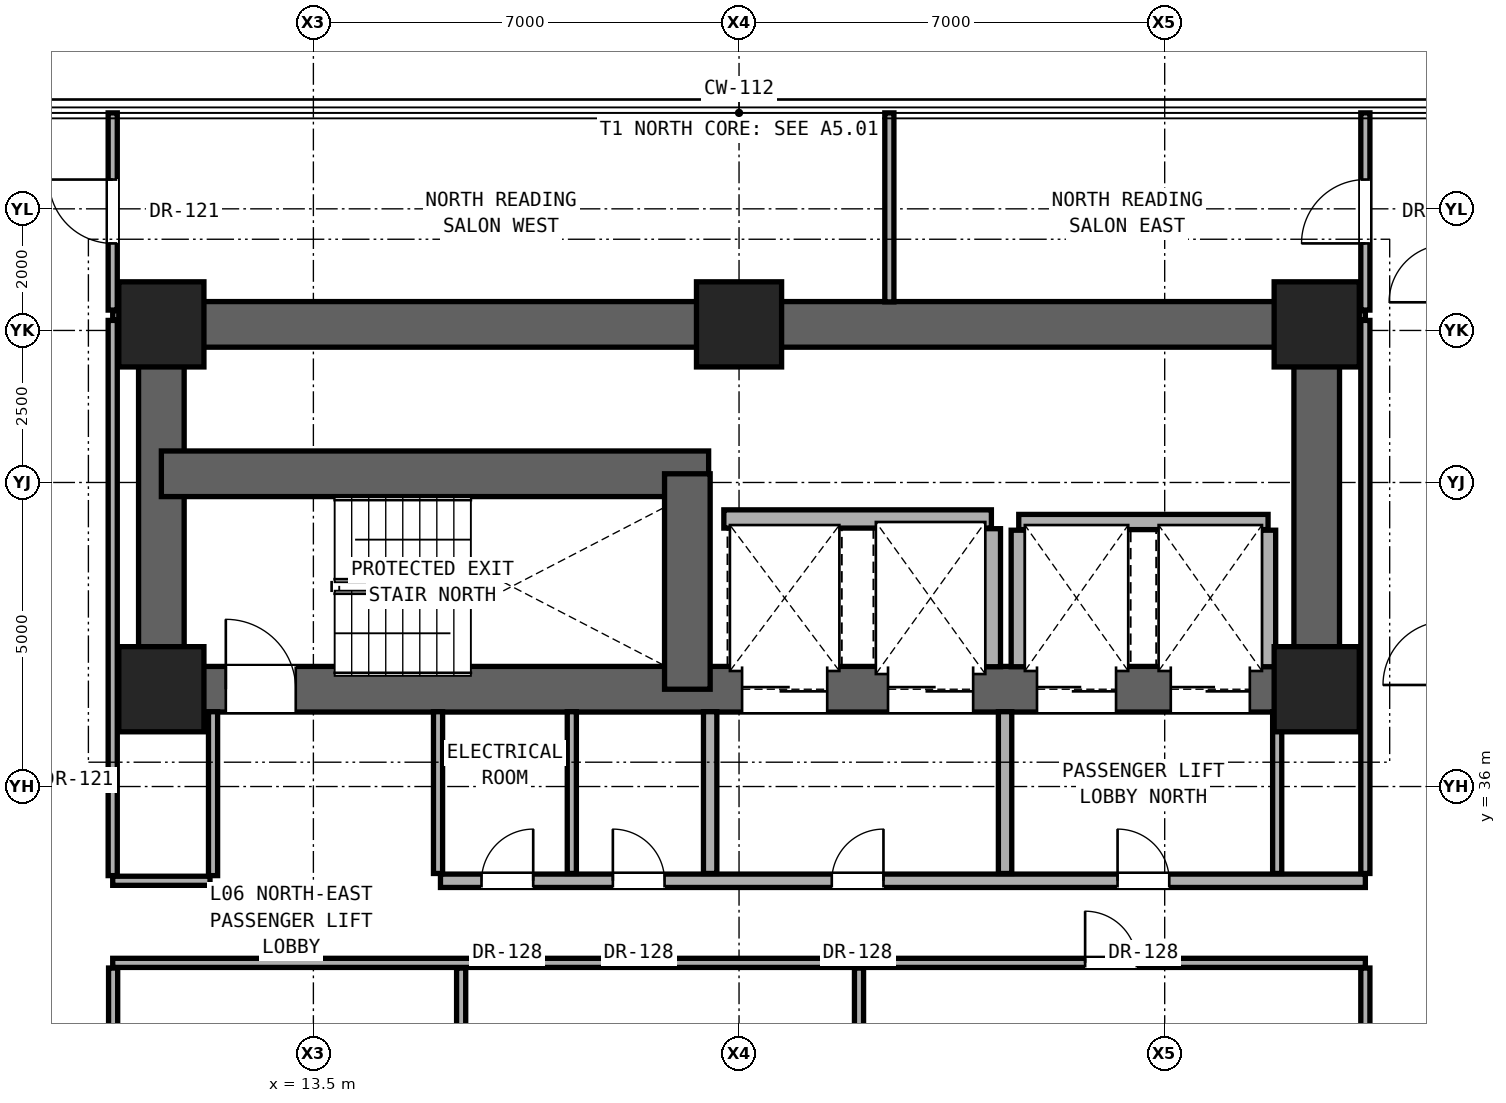
"""IFC4 building model, lengths in metres.
Left out: names, types, materials, properties, quantities, classifications, styles, units other than length and angle.
Written with IfcOpenShell. Run it as: python <this file> out.ifc"""

import sys

from ifc_helpers import new_model, si_unit, direction, frame, frame_2d, origin, origin_2d, place, context, subcontext, project, spatial, rectangle, extrude, element, fill, save


model = new_model("IFC4")
c1 = context("Model", 3, precision=1e-05, world=origin(), true_north=direction((0.0, 1.0)))
c2 = subcontext(c1, "Body", "Model", "MODEL_VIEW")
j1 = project(units=[si_unit("LENGTHUNIT", "METRE"), si_unit("PLANEANGLEUNIT", "RADIAN")], contexts=[c1])
p1 = place(None, origin())
s1 = spatial("IfcSite", under=j1, at=p1, CompositionType="ELEMENT")
p2 = place(p1, origin())
s2 = spatial("IfcBuilding", under=s1, at=p2, CompositionType="ELEMENT")
p3 = place(p2, frame((0.0, 0.0, 25.7)))
s3 = spatial("IfcBuildingStorey", under=s2, at=p3, CompositionType="ELEMENT", Elevation=25.7)
for number, where, z_axis, x_axis in (
    (1, (11.0, 37.6, 0.0), (0.0, 0.0, 1.0), (1.0, 0.0, 0.0)),
    (2, (30.0, 37.6, 0.0), (0.0, 0.0, 1.0), (1.0, 0.0, 0.0)),
    (3, (11.0, 43.6, 0.0), (0.0, 0.0, 1.0), (1.0, 0.0, 0.0)),
    (4, (20.5, 43.6, 0.0), (0.0, 0.0, 1.0), (1.0, 0.0, 0.0)),
    (5, (30.0, 43.6, 0.0), (0.0, 0.0, 1.0), (1.0, 0.0, 0.0)),
):
    element("IfcColumn", number, at=place(p3, frame(where, z_axis=z_axis, x_axis=x_axis)), inside=s3, PredefinedType="COLUMN", context=c2, shape_type="SweptSolid", body=[
        extrude(rectangle(XDim=1.4, YDim=1.4, at=origin_2d()), origin(), (0.0, 0.0, 1.0), 3.3),
    ])
p4 = place(p3, frame((11.0, 43.6, 0.0), z_axis=(0.0, 0.0, 1.0), x_axis=(1.0, 0.0, 0.0)))
e6 = element("IfcWall", 6, at=p4, inside=s3, PredefinedType="SHEAR", context=c2, shape_type="SweptSolid", body=[
    extrude(rectangle(XDim=19.0, YDim=0.75, at=frame_2d((9.5, 0.0))), origin(), (0.0, 0.0, 1.0), 3.06),
])
for number, where, z_axis, x_axis in (
    (7, (11.0, 37.6, 0.0), (0.0, 0.0, 1.0), (0.0, 1.0, 0.0)),
    (8, (30.0, 37.6, 0.0), (0.0, 0.0, 1.0), (0.0, 1.0, 0.0)),
):
    element("IfcWall", number, at=place(p3, frame(where, z_axis=z_axis, x_axis=x_axis)), inside=s3, PredefinedType="SHEAR", context=c2, shape_type="SweptSolid", body=[
        extrude(rectangle(XDim=6.0, YDim=0.75, at=frame_2d((3.0, 0.0))), origin(), (0.0, 0.0, 1.0), 3.06),
    ])
p5 = place(p3, frame((11.0, 37.6, 0.0), z_axis=(0.0, 0.0, 1.0), x_axis=(1.0, 0.0, 0.0)))
e9 = element("IfcWall", 9, at=p5, inside=s3, PredefinedType="SHEAR", context=c2, shape_type="SweptSolid", body=[
    extrude(rectangle(XDim=19.0, YDim=0.75, at=frame_2d((9.5, 0.0))), origin(), (0.0, 0.0, 1.0), 3.06),
])
p6 = place(p5, frame((1.06, 0.0, 0.0)))
e10 = element("IfcOpeningElement", 10, at=p6, cuts=e9, PredefinedType="OPENING", context=c2, shape_type="SweptSolid", body=[
    extrude(rectangle(XDim=1.15, YDim=2.2, at=frame_2d((0.575, 1.1))), frame((0.0, 0.385, 0.0), z_axis=(0.0, -1.0, 0.0), x_axis=(1.0, 0.0, 0.0)), (0.0, 0.0, 1.0), 0.77),
])
p7 = place(p5, frame((9.55, 0.0, 0.0)))
e11 = element("IfcOpeningElement", 11, at=p7, cuts=e9, PredefinedType="OPENING", context=c2, shape_type="SweptSolid", body=[
    extrude(rectangle(XDim=1.4, YDim=2.35, at=frame_2d((0.7, 1.175))), frame((0.0, 0.385, 0.0), z_axis=(0.0, -1.0, 0.0), x_axis=(1.0, 0.0, 0.0)), (0.0, 0.0, 1.0), 0.77),
])
p8 = place(p5, frame((11.95, 0.0, 0.0)))
e12 = element("IfcOpeningElement", 12, at=p8, cuts=e9, PredefinedType="OPENING", context=c2, shape_type="SweptSolid", body=[
    extrude(rectangle(XDim=1.4, YDim=2.35, at=frame_2d((0.7, 1.175))), frame((0.0, 0.385, 0.0), z_axis=(0.0, -1.0, 0.0), x_axis=(1.0, 0.0, 0.0)), (0.0, 0.0, 1.0), 0.77),
])
p9 = place(p5, frame((14.4, 0.0, 0.0)))
e13 = element("IfcOpeningElement", 13, at=p9, cuts=e9, PredefinedType="OPENING", context=c2, shape_type="SweptSolid", body=[
    extrude(rectangle(XDim=1.3, YDim=2.3, at=frame_2d((0.65, 1.15))), frame((0.0, 0.385, 0.0), z_axis=(0.0, -1.0, 0.0), x_axis=(1.0, 0.0, 0.0)), (0.0, 0.0, 1.0), 0.77),
])
p10 = place(p5, frame((16.6, 0.0, 0.0)))
e14 = element("IfcOpeningElement", 14, at=p10, cuts=e9, PredefinedType="OPENING", context=c2, shape_type="SweptSolid", body=[
    extrude(rectangle(XDim=1.3, YDim=2.3, at=frame_2d((0.65, 1.15))), frame((0.0, 0.385, 0.0), z_axis=(0.0, -1.0, 0.0), x_axis=(1.0, 0.0, 0.0)), (0.0, 0.0, 1.0), 0.77),
])
p11 = place(p3, frame((11.0, 41.143, 0.0), z_axis=(0.0, 0.0, 1.0), x_axis=(1.0, 0.0, 0.0)))
e15 = element("IfcWall", 15, at=p11, inside=s3, PredefinedType="SHEAR", context=c2, shape_type="SweptSolid", body=[
    extrude(rectangle(XDim=9.0, YDim=0.75, at=frame_2d((4.5, 0.0))), origin(), (0.0, 0.0, 1.0), 3.06),
])
p12 = place(p3, frame((19.65, 37.6, 0.0), z_axis=(0.0, 0.0, 1.0), x_axis=(0.0, 1.0, 0.0)))
e16 = element("IfcWall", 16, at=p12, inside=s3, PredefinedType="SHEAR", context=c2, shape_type="SweptSolid", body=[
    extrude(rectangle(XDim=3.543, YDim=0.75, at=frame_2d((1.771, 0.0))), origin(), (0.0, 0.0, 1.0), 3.06),
])
p13 = place(p3, frame((10.2, 33.1, 0.0), z_axis=(0.0, 0.0, 1.0), x_axis=(1.0, 0.0, 0.0)))
e17 = element("IfcWall", 17, at=p13, inside=s3, PredefinedType="PARTITIONING", context=c2, shape_type="SweptSolid", body=[
    extrude(rectangle(XDim=20.6, YDim=0.15, at=frame_2d((10.3, 0.0))), origin(), (0.0, 0.0, 1.0), 2.104),
])
p14 = place(p13, frame((15.991, 0.0, 0.0)))
e18 = element("IfcOpeningElement", 18, at=p14, cuts=e17, PredefinedType="OPENING", context=c2, shape_type="SweptSolid", body=[
    extrude(rectangle(XDim=0.85, YDim=2.01, at=frame_2d((0.425, 1.005))), frame((0.0, 0.085, 0.0), z_axis=(0.0, -1.0, 0.0), x_axis=(1.0, 0.0, 0.0)), (0.0, 0.0, 1.0), 0.17),
])
p15 = place(p3, frame((10.2, 34.45, 0.0), z_axis=(0.0, 0.0, 1.0), x_axis=(1.0, 0.0, 0.0)))
e19 = element("IfcWall", 19, at=p15, inside=s3, PredefinedType="PARTITIONING", context=c2, shape_type="SweptSolid", body=[
    extrude(rectangle(XDim=1.6, YDim=0.15, at=frame_2d((0.8, 0.0))), origin(), (0.0, 0.0, 1.0), 2.104),
])
p16 = place(p3, frame((15.59, 34.45, 0.0), z_axis=(0.0, 0.0, 1.0), x_axis=(1.0, 0.0, 0.0)))
e20 = element("IfcWall", 20, at=p16, inside=s3, PredefinedType="SOLIDWALL", context=c2, shape_type="SweptSolid", body=[
    extrude(rectangle(XDim=15.21, YDim=0.22, at=frame_2d((7.605, 0.0))), origin(), (0.0, 0.0, 1.0), 2.104),
])
p17 = place(p16, frame((6.435, 0.0, 0.0)))
e21 = element("IfcOpeningElement", 21, at=p17, cuts=e20, PredefinedType="OPENING", context=c2, shape_type="SweptSolid", body=[
    extrude(rectangle(XDim=0.85, YDim=2.01, at=frame_2d((0.425, 1.005))), frame((0.0, 0.12, 0.0), z_axis=(0.0, -1.0, 0.0), x_axis=(1.0, 0.0, 0.0)), (0.0, 0.0, 1.0), 0.24),
])
p18 = place(p16, frame((11.135, 0.0, 0.0)))
e22 = element("IfcOpeningElement", 22, at=p18, cuts=e20, PredefinedType="OPENING", context=c2, shape_type="SweptSolid", body=[
    extrude(rectangle(XDim=0.85, YDim=2.01, at=frame_2d((0.425, 1.005))), frame((0.0, 0.12, 0.0), z_axis=(0.0, -1.0, 0.0), x_axis=(1.0, 0.0, 0.0)), (0.0, 0.0, 1.0), 0.24),
])
p19 = place(p16, frame((0.675, 0.0, 0.0)))
e23 = element("IfcOpeningElement", 23, at=p19, cuts=e20, PredefinedType="OPENING", context=c2, shape_type="SweptSolid", body=[
    extrude(rectangle(XDim=0.85, YDim=2.01, at=frame_2d((0.425, 1.005))), frame((0.0, 0.12, 0.0), z_axis=(0.0, -1.0, 0.0), x_axis=(1.0, 0.0, 0.0)), (0.0, 0.0, 1.0), 0.24),
])
p20 = place(p16, frame((2.835, 0.0, 0.0)))
e24 = element("IfcOpeningElement", 24, at=p20, cuts=e20, PredefinedType="OPENING", context=c2, shape_type="SweptSolid", body=[
    extrude(rectangle(XDim=0.85, YDim=2.01, at=frame_2d((0.425, 1.005))), frame((0.0, 0.12, 0.0), z_axis=(0.0, -1.0, 0.0), x_axis=(1.0, 0.0, 0.0)), (0.0, 0.0, 1.0), 0.24),
])
p21 = place(p3, frame((25.1, 40.35, 0.0), z_axis=(0.0, 0.0, 1.0), x_axis=(1.0, 0.0, 0.0)))
e25 = element("IfcWall", 25, at=p21, inside=s3, PredefinedType="SOLIDWALL", context=c2, shape_type="SweptSolid", body=[
    extrude(rectangle(XDim=4.1, YDim=0.25, at=frame_2d((2.05, 0.0))), origin(), (0.0, 0.0, 1.0), 3.06),
])
p22 = place(p3, frame((20.25, 40.4, 0.0), z_axis=(0.0, 0.0, 1.0), x_axis=(1.0, 0.0, 0.0)))
e26 = element("IfcWall", 26, at=p22, inside=s3, PredefinedType="SOLIDWALL", context=c2, shape_type="SweptSolid", body=[
    extrude(rectangle(XDim=4.4, YDim=0.3, at=frame_2d((2.2, 0.0))), origin(), (0.0, 0.0, 1.0), 3.06),
])
for number, where, z_axis, x_axis in (
    (27, (10.2, 43.75, 0.0), (0.0, 0.0, 1.0), (1.0, 0.0, 0.0)),
    (28, (30.37, 43.75, 0.0), (0.0, 0.0, 1.0), (1.0, 0.0, 0.0)),
):
    element("IfcWall", number, at=place(p3, frame(where, z_axis=z_axis, x_axis=x_axis)), inside=s3, PredefinedType="PARTITIONING", context=c2, shape_type="SweptSolid", body=[
        extrude(rectangle(XDim=0.43, YDim=0.15, at=frame_2d((0.215, 0.0))), origin(), (0.0, 0.0, 1.0), 3.06),
    ])
p23 = place(p3, frame((10.207, 22.935, 0.0), z_axis=(0.0, 0.0, 1.0), x_axis=(0.0, 1.0, 0.0)))
e29 = element("IfcWall", 29, at=p23, inside=s3, PredefinedType="PARTITIONING", context=c2, shape_type="SweptSolid", body=[
    extrude(rectangle(XDim=10.08, YDim=0.15, at=frame_2d((5.04, 0.0))), origin(), (0.0, 0.0, 1.0), 2.279),
])
p24 = place(p23, frame((4.565, 0.0, 0.0)))
e30 = element("IfcOpeningElement", 30, at=p24, cuts=e29, PredefinedType="OPENING", context=c2, shape_type="SweptSolid", body=[
    extrude(rectangle(XDim=0.95, YDim=2.15, at=frame_2d((0.475, 1.075))), frame((0.0, 0.085, 0.0), z_axis=(0.0, -1.0, 0.0), x_axis=(1.0, 0.0, 0.0)), (0.0, 0.0, 1.0), 0.17),
])
p25 = place(p3, frame((10.2, 34.535, 0.0), z_axis=(0.0, 0.0, 1.0), x_axis=(0.0, 1.0, 0.0)))
e31 = element("IfcWall", 31, at=p25, inside=s3, PredefinedType="PARTITIONING", context=c2, shape_type="SweptSolid", body=[
    extrude(rectangle(XDim=9.13, YDim=0.15, at=frame_2d((4.565, 0.0))), origin(), (0.0, 0.0, 1.0), 2.436),
])
p26 = place(p3, frame((10.2, 43.835, 0.0), z_axis=(0.0, 0.0, 1.0), x_axis=(0.0, 1.0, 0.0)))
e32 = element("IfcWall", 32, at=p26, inside=s3, PredefinedType="PARTITIONING", context=c2, shape_type="SweptSolid", body=[
    extrude(rectangle(XDim=3.243, YDim=0.15, at=frame_2d((1.622, 0.0))), origin(), (0.0, 0.0, 1.0), 3.06),
])
p27 = place(p26, frame((1.096, 0.0, 0.0)))
e33 = element("IfcOpeningElement", 33, at=p27, cuts=e32, PredefinedType="OPENING", context=c2, shape_type="SweptSolid", body=[
    extrude(rectangle(XDim=1.05, YDim=2.2, at=frame_2d((0.525, 1.1))), frame((0.0, 0.085, 0.0), z_axis=(0.0, -1.0, 0.0), x_axis=(1.0, 0.0, 0.0)), (0.0, 0.0, 1.0), 0.17),
])
p28 = place(p3, frame((11.85, 34.535, 0.0), z_axis=(0.0, 0.0, 1.0), x_axis=(0.0, 1.0, 0.0)))
e34 = element("IfcWall", 34, at=p28, inside=s3, PredefinedType="PARTITIONING", context=c2, shape_type="SweptSolid", body=[
    extrude(rectangle(XDim=2.695, YDim=0.15, at=frame_2d((1.348, 0.0))), origin(), (0.0, 0.0, 1.0), 3.06),
])
p29 = place(p3, frame((15.55, 34.57, 0.0), z_axis=(0.0, 0.0, 1.0), x_axis=(0.0, 1.0, 0.0)))
e35 = element("IfcWall", 35, at=p29, inside=s3, PredefinedType="PARTITIONING", context=c2, shape_type="SweptSolid", body=[
    extrude(rectangle(XDim=2.66, YDim=0.15, at=frame_2d((1.33, 0.0))), origin(), (0.0, 0.0, 1.0), 2.589),
])
p30 = place(p3, frame((15.93, 22.935, 0.0), z_axis=(0.0, 0.0, 1.0), x_axis=(0.0, 1.0, 0.0)))
e36 = element("IfcWall", 36, at=p30, inside=s3, PredefinedType="PARTITIONING", context=c2, shape_type="SweptSolid", body=[
    extrude(rectangle(XDim=10.08, YDim=0.15, at=frame_2d((5.04, 0.0))), origin(), (0.0, 0.0, 1.0), 2.104),
])
p31 = place(p3, frame((17.75, 34.57, 0.0), z_axis=(0.0, 0.0, 1.0), x_axis=(0.0, 1.0, 0.0)))
e37 = element("IfcWall", 37, at=p31, inside=s3, PredefinedType="PARTITIONING", context=c2, shape_type="SweptSolid", body=[
    extrude(rectangle(XDim=2.66, YDim=0.15, at=frame_2d((1.33, 0.0))), origin(), (0.0, 0.0, 1.0), 3.06),
])
p32 = place(p3, frame((20.025, 34.57, 0.0), z_axis=(0.0, 0.0, 1.0), x_axis=(0.0, 1.0, 0.0)))
e38 = element("IfcWall", 38, at=p32, inside=s3, PredefinedType="SOLIDWALL", context=c2, shape_type="SweptSolid", body=[
    extrude(rectangle(XDim=2.66, YDim=0.22, at=frame_2d((1.33, 0.0))), origin(), (0.0, 0.0, 1.0), 3.06),
])
p33 = place(p3, frame((22.473, 19.985, 0.0), z_axis=(0.0, 0.0, 1.0), x_axis=(0.0, 1.0, 0.0)))
e39 = element("IfcWall", 39, at=p33, inside=s3, PredefinedType="PARTITIONING", context=c2, shape_type="SweptSolid", body=[
    extrude(rectangle(XDim=13.03, YDim=0.15, at=frame_2d((6.515, 0.0))), origin(), (0.0, 0.0, 1.0), 2.104),
])
p34 = place(p3, frame((22.972, 43.97, 0.0), z_axis=(0.0, 0.0, 1.0), x_axis=(0.0, 1.0, 0.0)))
e40 = element("IfcWall", 40, at=p34, inside=s3, PredefinedType="PARTITIONING", context=c2, shape_type="SweptSolid", body=[
    extrude(rectangle(XDim=3.108, YDim=0.15, at=frame_2d((1.554, 0.0))), origin(), (0.0, 0.0, 1.0), 3.06),
])
p35 = place(p3, frame((24.65, 37.97, 0.0), z_axis=(0.0, 0.0, 1.0), x_axis=(0.0, 1.0, 0.0)))
e41 = element("IfcWall", 41, at=p35, inside=s3, PredefinedType="SOLIDWALL", context=c2, shape_type="SweptSolid", body=[
    extrude(rectangle(XDim=2.27, YDim=0.3, at=frame_2d((1.135, 0.0))), origin(), (0.0, 0.0, 1.0), 3.06),
])
p36 = place(p3, frame((24.875, 34.57, 0.0), z_axis=(0.0, 0.0, 1.0), x_axis=(0.0, 1.0, 0.0)))
e42 = element("IfcWall", 42, at=p36, inside=s3, PredefinedType="SOLIDWALL", context=c2, shape_type="SweptSolid", body=[
    extrude(rectangle(XDim=2.66, YDim=0.22, at=frame_2d((1.33, 0.0))), origin(), (0.0, 0.0, 1.0), 3.06),
])
p37 = place(p3, frame((25.1, 37.97, 0.0), z_axis=(0.0, 0.0, 1.0), x_axis=(0.0, 1.0, 0.0)))
e43 = element("IfcWall", 43, at=p37, inside=s3, PredefinedType="SOLIDWALL", context=c2, shape_type="SweptSolid", body=[
    extrude(rectangle(XDim=2.245, YDim=0.25, at=frame_2d((1.123, 0.0))), origin(), (0.0, 0.0, 1.0), 3.06),
])
p38 = place(p3, frame((29.35, 34.57, 0.0), z_axis=(0.0, 0.0, 1.0), x_axis=(0.0, 1.0, 0.0)))
e44 = element("IfcWall", 44, at=p38, inside=s3, PredefinedType="PARTITIONING", context=c2, shape_type="SweptSolid", body=[
    extrude(rectangle(XDim=2.66, YDim=0.15, at=frame_2d((1.33, 0.0))), origin(), (0.0, 0.0, 1.0), 3.06),
])
p39 = place(p3, frame((29.2, 37.97, 0.0), z_axis=(0.0, 0.0, 1.0), x_axis=(0.0, 1.0, 0.0)))
e45 = element("IfcWall", 45, at=p39, inside=s3, PredefinedType="SOLIDWALL", context=c2, shape_type="SweptSolid", body=[
    extrude(rectangle(XDim=2.245, YDim=0.25, at=frame_2d((1.123, 0.0))), origin(), (0.0, 0.0, 1.0), 3.06),
])
p40 = place(p3, frame((30.8, 19.985, 0.0), z_axis=(0.0, 0.0, 1.0), x_axis=(0.0, 1.0, 0.0)))
e46 = element("IfcWall", 46, at=p40, inside=s3, PredefinedType="PARTITIONING", context=c2, shape_type="SweptSolid", body=[
    extrude(rectangle(XDim=13.03, YDim=0.15, at=frame_2d((6.515, 0.0))), origin(), (0.0, 0.0, 1.0), 2.279),
])
p41 = place(p3, frame((30.8, 34.57, 0.0), z_axis=(0.0, 0.0, 1.0), x_axis=(0.0, 1.0, 0.0)))
e47 = element("IfcWall", 47, at=p41, inside=s3, PredefinedType="PARTITIONING", context=c2, shape_type="SweptSolid", body=[
    extrude(rectangle(XDim=9.095, YDim=0.15, at=frame_2d((4.547, 0.0))), origin(), (0.0, 0.0, 1.0), 2.436),
])
p42 = place(p3, frame((30.8, 43.835, 0.0), z_axis=(0.0, 0.0, 1.0), x_axis=(0.0, 1.0, 0.0)))
e48 = element("IfcWall", 48, at=p42, inside=s3, PredefinedType="PARTITIONING", context=c2, shape_type="SweptSolid", body=[
    extrude(rectangle(XDim=3.243, YDim=0.15, at=frame_2d((1.622, 0.0))), origin(), (0.0, 0.0, 1.0), 3.06),
])
p43 = place(p42, frame((1.096, 0.0, 0.0)))
e49 = element("IfcOpeningElement", 49, at=p43, cuts=e48, PredefinedType="OPENING", context=c2, shape_type="SweptSolid", body=[
    extrude(rectangle(XDim=1.05, YDim=2.2, at=frame_2d((0.525, 1.1))), frame((0.0, 0.085, 0.0), z_axis=(0.0, -1.0, 0.0), x_axis=(1.0, 0.0, 0.0)), (0.0, 0.0, 1.0), 0.17),
])
p44 = place(p6, origin())
e50 = element("IfcDoor", 50, at=p44, inside=s3, OperationType="SINGLE_SWING_LEFT", PredefinedType="DOOR", context=c2, shape_type="SweptSolid", body=[
    extrude(rectangle(XDim=1.15, YDim=2.2, at=frame_2d((0.575, 1.1))), frame((0.0, 0.025, 0.0), z_axis=(0.0, -1.0, 0.0), x_axis=(1.0, 0.0, 0.0)), (0.0, 0.0, 1.0), 0.05),
])
fill(e10, e50)
p45 = place(p17, origin())
e51 = element("IfcDoor", 51, at=p45, inside=s3, OperationType="SINGLE_SWING_RIGHT", PredefinedType="DOOR", context=c2, shape_type="SweptSolid", body=[
    extrude(rectangle(XDim=0.85, YDim=2.01, at=frame_2d((0.425, 1.005))), frame((0.0, 0.025, 0.0), z_axis=(0.0, -1.0, 0.0), x_axis=(1.0, 0.0, 0.0)), (0.0, 0.0, 1.0), 0.05),
])
fill(e21, e51)
p46 = place(p18, origin())
e52 = element("IfcDoor", 52, at=p46, inside=s3, OperationType="SINGLE_SWING_LEFT", PredefinedType="DOOR", context=c2, shape_type="SweptSolid", body=[
    extrude(rectangle(XDim=0.85, YDim=2.01, at=frame_2d((0.425, 1.005))), frame((0.0, 0.025, 0.0), z_axis=(0.0, -1.0, 0.0), x_axis=(1.0, 0.0, 0.0)), (0.0, 0.0, 1.0), 0.05),
])
fill(e22, e52)
p47 = place(p19, origin())
e53 = element("IfcDoor", 53, at=p47, inside=s3, OperationType="SINGLE_SWING_RIGHT", PredefinedType="DOOR", context=c2, shape_type="SweptSolid", body=[
    extrude(rectangle(XDim=0.85, YDim=2.01, at=frame_2d((0.425, 1.005))), frame((0.0, 0.025, 0.0), z_axis=(0.0, -1.0, 0.0), x_axis=(1.0, 0.0, 0.0)), (0.0, 0.0, 1.0), 0.05),
])
fill(e23, e53)
p48 = place(p20, origin())
e54 = element("IfcDoor", 54, at=p48, inside=s3, OperationType="SINGLE_SWING_LEFT", PredefinedType="DOOR", context=c2, shape_type="SweptSolid", body=[
    extrude(rectangle(XDim=0.85, YDim=2.01, at=frame_2d((0.425, 1.005))), frame((0.0, 0.025, 0.0), z_axis=(0.0, -1.0, 0.0), x_axis=(1.0, 0.0, 0.0)), (0.0, 0.0, 1.0), 0.05),
])
fill(e24, e54)
p49 = place(p14, origin())
e55 = element("IfcDoor", 55, at=p49, inside=s3, OperationType="SINGLE_SWING_LEFT", PredefinedType="DOOR", context=c2, shape_type="SweptSolid", body=[
    extrude(rectangle(XDim=0.85, YDim=2.01, at=frame_2d((0.425, 1.005))), frame((0.0, 0.025, 0.0), z_axis=(0.0, -1.0, 0.0), x_axis=(1.0, 0.0, 0.0)), (0.0, 0.0, 1.0), 0.05),
])
fill(e18, e55)
p50 = place(p27, origin())
e56 = element("IfcDoor", 56, at=p50, inside=s3, OperationType="SINGLE_SWING_RIGHT", PredefinedType="DOOR", context=c2, shape_type="SweptSolid", body=[
    extrude(rectangle(XDim=1.05, YDim=2.2, at=frame_2d((0.525, 1.1))), frame((0.0, 0.025, 0.0), z_axis=(0.0, -1.0, 0.0), x_axis=(1.0, 0.0, 0.0)), (0.0, 0.0, 1.0), 0.05),
])
fill(e33, e56)
p51 = place(p43, origin())
e57 = element("IfcDoor", 57, at=p51, inside=s3, OperationType="SINGLE_SWING_LEFT", PredefinedType="DOOR", context=c2, shape_type="SweptSolid", body=[
    extrude(rectangle(XDim=1.05, YDim=2.2, at=frame_2d((0.525, 1.1))), frame((0.0, 0.025, 0.0), z_axis=(0.0, -1.0, 0.0), x_axis=(1.0, 0.0, 0.0)), (0.0, 0.0, 1.0), 0.05),
])
fill(e49, e57)
p52 = place(p7, origin())
e58 = element("IfcDoor", 58, at=p52, inside=s3, OperationType="DOUBLE_DOOR_SLIDING", PredefinedType="DOOR", context=c2, shape_type="SweptSolid", body=[
    extrude(rectangle(XDim=1.4, YDim=2.35, at=frame_2d((0.7, 1.175))), frame((0.0, 0.025, 0.0), z_axis=(0.0, -1.0, 0.0), x_axis=(1.0, 0.0, 0.0)), (0.0, 0.0, 1.0), 0.05),
])
fill(e11, e58)
p53 = place(p8, origin())
e59 = element("IfcDoor", 59, at=p53, inside=s3, OperationType="DOUBLE_DOOR_SLIDING", PredefinedType="DOOR", context=c2, shape_type="SweptSolid", body=[
    extrude(rectangle(XDim=1.4, YDim=2.35, at=frame_2d((0.7, 1.175))), frame((0.0, 0.025, 0.0), z_axis=(0.0, -1.0, 0.0), x_axis=(1.0, 0.0, 0.0)), (0.0, 0.0, 1.0), 0.05),
])
fill(e12, e59)
p54 = place(p9, origin())
e60 = element("IfcDoor", 60, at=p54, inside=s3, OperationType="DOUBLE_DOOR_SLIDING", PredefinedType="DOOR", context=c2, shape_type="SweptSolid", body=[
    extrude(rectangle(XDim=1.3, YDim=2.3, at=frame_2d((0.65, 1.15))), frame((0.0, 0.025, 0.0), z_axis=(0.0, -1.0, 0.0), x_axis=(1.0, 0.0, 0.0)), (0.0, 0.0, 1.0), 0.05),
])
fill(e13, e60)
p55 = place(p10, origin())
e61 = element("IfcDoor", 61, at=p55, inside=s3, OperationType="DOUBLE_DOOR_SLIDING", PredefinedType="DOOR", context=c2, shape_type="SweptSolid", body=[
    extrude(rectangle(XDim=1.3, YDim=2.3, at=frame_2d((0.65, 1.15))), frame((0.0, 0.025, 0.0), z_axis=(0.0, -1.0, 0.0), x_axis=(1.0, 0.0, 0.0)), (0.0, 0.0, 1.0), 0.05),
])
fill(e14, e61)
save(model, sys.argv[1])
